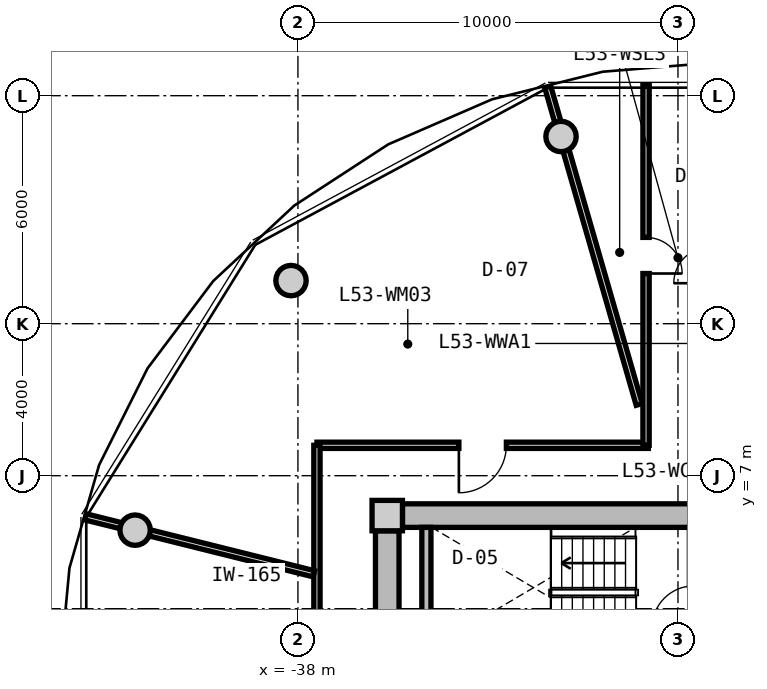
"""IFC4 building model, lengths in metres.
Left out: names, types, materials, properties, quantities, classifications, styles, units other than length and angle.
Written with IfcOpenShell. Run it as: python <this file> out.ifc"""

import sys

from ifc_helpers import new_model, si_unit, direction, frame, frame_2d, origin, origin_2d, place, context, subcontext, project, spatial, rectangle, circle, extrude, source, transform, mapped, element, fill, save


model = new_model("IFC4")
c1 = context("Model", 3, precision=1e-05, world=origin(), true_north=direction((0.0, 1.0)))
c2 = subcontext(c1, "Body", "Model", "MODEL_VIEW")
j1 = project(units=[si_unit("LENGTHUNIT", "METRE"), si_unit("PLANEANGLEUNIT", "RADIAN")], contexts=[c1])
p1 = place(None, origin())
s1 = spatial("IfcSite", under=j1, at=p1, CompositionType="ELEMENT")
p2 = place(p1, origin())
s2 = spatial("IfcBuilding", under=s1, at=p2, CompositionType="ELEMENT")
p3 = place(p2, frame((0.0, 0.0, 170.9)))
s3 = spatial("IfcBuildingStorey", under=s2, at=p3, CompositionType="ELEMENT", Elevation=170.9)
m1 = source(origin(), c2, "Body", "SweptSolid", [
    extrude(rectangle(XDim=0.8, YDim=0.8, at=origin_2d()), origin(), (0.0, 0.0, 1.0), 3.05),
])
p4 = place(p3, frame((-35.65, 5.95, 0.0), z_axis=(0.0, 0.0, 1.0), x_axis=(1.0, 0.0, 0.0)))
e1 = element("IfcColumn", 1, at=p4, inside=s3, PredefinedType="COLUMN", context=c2, shape_type="MappedRepresentation", body=[
    mapped(m1, transform((0.0, 0.0, 0.0), x_axis=(1.0, 0.0, 0.0), y_axis=(0.0, 1.0, 0.0), z_axis=(0.0, 0.0, 1.0), scale=1.0)),
])
m2 = source(origin(), c2, "Body", "SweptSolid", [
    extrude(rectangle(XDim=14.5, YDim=0.62, at=frame_2d((7.25, 0.0))), origin(), (0.0, 0.0, 1.0), 2.81),
])
p5 = place(p3, frame((-35.25, 5.95, 0.0), z_axis=(0.0, 0.0, 1.0), x_axis=(1.0, 0.0, 0.0)))
e2 = element("IfcWall", 2, at=p5, inside=s3, PredefinedType="SHEAR", context=c2, shape_type="MappedRepresentation", body=[
    mapped(m2, transform((0.0, 0.0, 0.0), x_axis=(1.0, 0.0, 0.0), y_axis=(0.0, 1.0, 0.0), z_axis=(0.0, 0.0, 1.0), scale=1.0)),
])
m3 = source(origin(), c2, "Body", "SweptSolid", [
    extrude(rectangle(XDim=11.1, YDim=0.62, at=frame_2d((5.55, 0.0))), origin(), (0.0, 0.0, 1.0), 2.81),
])
p6 = place(p3, frame((-35.65, -5.55, 0.0), z_axis=(0.0, 0.0, 1.0), x_axis=(0.0, 1.0, 0.0)))
e3 = element("IfcWall", 3, at=p6, inside=s3, PredefinedType="SHEAR", context=c2, shape_type="MappedRepresentation", body=[
    mapped(m3, transform((0.0, 0.0, 0.0), x_axis=(1.0, 0.0, 0.0), y_axis=(0.0, 1.0, 0.0), z_axis=(0.0, 0.0, 1.0), scale=1.0)),
])
p7 = place(p6, frame((3.8, 0.0, 0.0)))
e4 = element("IfcOpeningElement", 4, at=p7, cuts=e3, PredefinedType="OPENING", context=c2, shape_type="SweptSolid", body=[
    extrude(rectangle(XDim=1.2, YDim=2.15, at=frame_2d((0.6, 1.075))), frame((0.0, 0.32, 0.0), z_axis=(0.0, -1.0, 0.0), x_axis=(1.0, 0.0, 0.0)), (0.0, 0.0, 1.0), 0.64),
])
m4 = source(origin(), c2, "Body", "SweptSolid", [
    extrude(circle(Radius=0.4, at=origin_2d()), origin(), (0.0, 0.0, 1.0), 3.05),
])
for number, where, z_axis, x_axis in (
    (5, (-31.077, 15.926, 0.0), (0.0, 0.0, 1.0), (1.0, 0.0, 0.0)),
    (6, (-38.183, 12.135, 0.0), (0.0, 0.0, 1.0), (1.0, 0.0, 0.0)),
    (7, (-42.285, 5.567, 0.0), (0.0, 0.0, 1.0), (1.0, 0.0, 0.0)),
):
    element("IfcColumn", number, at=place(p3, frame(where, z_axis=z_axis, x_axis=x_axis)), inside=s3, PredefinedType="COLUMN", context=c2, shape_type="MappedRepresentation", body=[
        mapped(m4, transform((0.0, 0.0, 0.0), x_axis=(1.0, 0.0, 0.0), y_axis=(0.0, 1.0, 0.0), z_axis=(0.0, 0.0, 1.0), scale=1.0)),
    ])
m5 = source(origin(), c2, "Body", "SweptSolid", [
    extrude(rectangle(XDim=3.19, YDim=0.24, at=frame_2d((1.595, 0.0))), origin(), (0.0, 0.0, 1.0), 2.81),
])
p8 = place(p3, frame((-34.62, 2.45, 0.0), z_axis=(0.0, 0.0, 1.0), x_axis=(0.0, 1.0, 0.0)))
e8 = element("IfcWall", 8, at=p8, inside=s3, PredefinedType="PARTITIONING", context=c2, shape_type="MappedRepresentation", body=[
    mapped(m5, transform((0.0, 0.0, 0.0), x_axis=(1.0, 0.0, 0.0), y_axis=(0.0, 1.0, 0.0), z_axis=(0.0, 0.0, 1.0), scale=1.0)),
])
m6 = source(origin(), c2, "Body", "SweptSolid", [
    extrude(rectangle(XDim=8.719, YDim=0.165, at=frame_2d((4.36, 0.0))), origin(), (0.0, 0.0, 1.0), 2.795),
])
p9 = place(p3, frame((-37.5, 7.8, 0.0), z_axis=(0.0, 0.0, 1.0), x_axis=(1.0, 0.0, 0.0)))
e9 = element("IfcWall", 9, at=p9, inside=s3, PredefinedType="PARTITIONING", context=c2, shape_type="MappedRepresentation", body=[
    mapped(m6, transform((0.0, 0.0, 0.0), x_axis=(1.0, 0.0, 0.0), y_axis=(0.0, 1.0, 0.0), z_axis=(0.0, 0.0, 1.0), scale=1.0)),
])
p10 = place(p9, frame((3.735, 0.0, 0.0)))
e10 = element("IfcOpeningElement", 10, at=p10, cuts=e9, PredefinedType="OPENING", context=c2, shape_type="SweptSolid", body=[
    extrude(rectangle(XDim=1.25, YDim=2.2, at=frame_2d((0.625, 1.1))), frame((0.0, 0.093, 0.0), z_axis=(0.0, -1.0, 0.0), x_axis=(1.0, 0.0, 0.0)), (0.0, 0.0, 1.0), 0.185),
])
m7 = source(origin(), c2, "Body", "SweptSolid", [
    extrude(rectangle(XDim=6.88, YDim=0.165, at=frame_2d((3.44, 0.0))), origin(), (0.0, 0.0, 1.0), 2.795),
])
p11 = place(p3, frame((-37.5, 0.92, 0.0), z_axis=(0.0, 0.0, 1.0), x_axis=(0.0, 1.0, 0.0)))
e11 = element("IfcWall", 11, at=p11, inside=s3, PredefinedType="PARTITIONING", context=c2, shape_type="MappedRepresentation", body=[
    mapped(m7, transform((0.0, 0.0, 0.0), x_axis=(1.0, 0.0, 0.0), y_axis=(0.0, 1.0, 0.0), z_axis=(0.0, 0.0, 1.0), scale=1.0)),
])
m8 = source(origin(), c2, "Body", "SweptSolid", [
    extrude(rectangle(XDim=8.695, YDim=0.165, at=frame_2d((4.348, 0.0))), origin(), (0.0, 0.0, 1.0), 2.345),
])
p12 = place(p3, frame((-29.02, 8.875, 0.0), z_axis=(0.0, 0.0, 1.0), x_axis=(-0.276797231892, 0.960928349263, 0.0)))
e12 = element("IfcWall", 12, at=p12, inside=s3, PredefinedType="PARTITIONING", context=c2, shape_type="MappedRepresentation", body=[
    mapped(m8, transform((0.0, 0.0, 0.0), x_axis=(1.0, 0.0, 0.0), y_axis=(0.0, 1.0, 0.0), z_axis=(0.0, 0.0, 1.0), scale=1.0)),
])
m9 = source(origin(), c2, "Body", "SweptSolid", [
    extrude(rectangle(XDim=6.193, YDim=0.165, at=frame_2d((3.096, 0.0))), origin(), (0.0, 0.0, 1.0), 2.345),
])
p13 = place(p3, frame((-37.58, 4.419, 0.0), z_axis=(0.0, 0.0, 1.0), x_axis=(-0.970309243466, 0.241867674657, 0.0)))
e13 = element("IfcWall", 13, at=p13, inside=s3, PredefinedType="PARTITIONING", context=c2, shape_type="MappedRepresentation", body=[
    mapped(m9, transform((0.0, 0.0, 0.0), x_axis=(1.0, 0.0, 0.0), y_axis=(0.0, 1.0, 0.0), z_axis=(0.0, 0.0, 1.0), scale=1.0)),
])
m10 = source(origin(), c2, "Body", "SweptSolid", [
    extrude(rectangle(XDim=9.48, YDim=0.165, at=frame_2d((4.74, 0.0))), origin(), (0.0, 0.0, 1.0), 2.795),
])
p14 = place(p3, frame((-28.84, 7.8, 0.0), z_axis=(0.0, 0.0, 1.0), x_axis=(0.0, 1.0, 0.0)))
e14 = element("IfcWall", 14, at=p14, inside=s3, PredefinedType="PARTITIONING", context=c2, shape_type="MappedRepresentation", body=[
    mapped(m10, transform((0.0, 0.0, 0.0), x_axis=(1.0, 0.0, 0.0), y_axis=(0.0, 1.0, 0.0), z_axis=(0.0, 0.0, 1.0), scale=1.0)),
])
p15 = place(p14, frame((4.521, 0.0, 0.0)))
e15 = element("IfcOpeningElement", 15, at=p15, cuts=e14, PredefinedType="OPENING", context=c2, shape_type="SweptSolid", body=[
    extrude(rectangle(XDim=0.95, YDim=2.1, at=frame_2d((0.475, 1.05))), frame((0.0, 0.093, 0.0), z_axis=(0.0, -1.0, 0.0), x_axis=(1.0, 0.0, 0.0)), (0.0, 0.0, 1.0), 0.185),
])
m11 = source(origin(), c2, "Body", "SweptSolid", [
    extrude(rectangle(XDim=0.95, YDim=2.1, at=frame_2d((0.475, 1.05))), frame((0.0, 0.025, 0.0), z_axis=(0.0, -1.0, 0.0), x_axis=(1.0, 0.0, 0.0)), (0.0, 0.0, 1.0), 0.05),
])
p16 = place(p15, frame((0.95, 0.0, 0.0), z_axis=(0.0, 0.0, 1.0), x_axis=(-1.0, 0.0, 0.0)))
e16 = element("IfcDoor", 16, at=p16, inside=s3, OperationType="SINGLE_SWING_RIGHT", PredefinedType="DOOR", context=c2, shape_type="MappedRepresentation", body=[
    mapped(m11, transform((0.0, 0.0, 0.0), x_axis=(1.0, 0.0, 0.0), y_axis=(0.0, 1.0, 0.0), z_axis=(0.0, 0.0, 1.0), scale=1.0)),
])
fill(e15, e16)
m12 = source(origin(), c2, "Body", "SweptSolid", [
    extrude(rectangle(XDim=1.25, YDim=2.2, at=frame_2d((0.625, 1.1))), frame((0.0, 0.025, 0.0), z_axis=(0.0, -1.0, 0.0), x_axis=(1.0, 0.0, 0.0)), (0.0, 0.0, 1.0), 0.05),
])
p17 = place(p10, frame((1.25, 0.0, 0.0), z_axis=(0.0, 0.0, 1.0), x_axis=(-1.0, 0.0, 0.0)))
e17 = element("IfcDoor", 17, at=p17, inside=s3, OperationType="SINGLE_SWING_RIGHT", PredefinedType="DOOR", context=c2, shape_type="MappedRepresentation", body=[
    mapped(m12, transform((0.0, 0.0, 0.0), x_axis=(1.0, 0.0, 0.0), y_axis=(0.0, 1.0, 0.0), z_axis=(0.0, 0.0, 1.0), scale=1.0)),
])
fill(e10, e17)
save(model, sys.argv[1])
